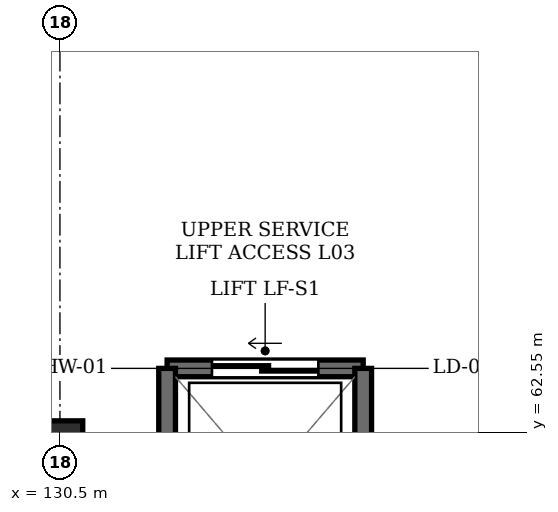
"""IFC4 building model, lengths in metres.
Left out: names, types, materials, properties, quantities, classifications, styles, units other than length and angle.
Written with IfcOpenShell. Run it as: python <this file> out.ifc"""

import sys

from ifc_helpers import new_model, si_unit, direction, frame, frame_2d, origin, origin_2d, place, context, subcontext, project, spatial, rectangle, extrude, element, fill, save


model = new_model("IFC4")
c1 = context("Model", 3, precision=1e-05, world=origin(), true_north=direction((0.0, 1.0)))
c2 = subcontext(c1, "Body", "Model", "MODEL_VIEW")
j1 = project(units=[si_unit("LENGTHUNIT", "METRE"), si_unit("PLANEANGLEUNIT", "RADIAN")], contexts=[c1])
p1 = place(None, origin())
s1 = spatial("IfcSite", under=j1, at=p1, CompositionType="ELEMENT")
p2 = place(p1, origin())
s2 = spatial("IfcBuilding", under=s1, at=p2, CompositionType="ELEMENT")
p3 = place(p2, frame((0.0, 0.0, 14.0)))
s3 = spatial("IfcBuildingStorey", under=s2, at=p3, CompositionType="ELEMENT", Elevation=14.0)
p4 = place(p3, frame((130.5, 62.4, -0.28), z_axis=(0.0, 0.0, 1.0), x_axis=(1.0, 0.0, 0.0)))
e1 = element("IfcColumn", 1, at=p4, inside=s3, PredefinedType="COLUMN", context=c2, shape_type="SweptSolid", body=[
    extrude(rectangle(XDim=0.6, YDim=0.6, at=origin_2d()), origin(), (0.0, 0.0, 1.0), 9.93),
])
p5 = place(p3, frame((134.49, 63.39, 0.0), z_axis=(0.0, 0.0, 1.0), x_axis=(-1.0, 0.0, 0.0)))
e2 = element("IfcWall", 2, at=p5, inside=s3, PredefinedType="SHEAR", context=c2, shape_type="SweptSolid", body=[
    extrude(rectangle(XDim=2.58, YDim=0.22, at=frame_2d((1.29, 0.0))), origin(), (0.0, 0.0, 1.0), 9.65),
])
p6 = place(p5, frame((0.59, 0.0, 0.0)))
e3 = element("IfcOpeningElement", 3, at=p6, cuts=e2, PredefinedType="OPENING", context=c2, shape_type="SweptSolid", body=[
    extrude(rectangle(XDim=1.4, YDim=2.3, at=frame_2d((0.7, 1.15))), frame((0.0, 0.122, 0.0), z_axis=(0.0, -1.0, 0.0), x_axis=(1.0, 0.0, 0.0)), (0.0, 0.0, 1.0), 0.244),
])
for number, where, z_axis, x_axis in (
    (4, (131.91, 63.39, 0.0), (0.0, 0.0, 1.0), (0.0, -1.0, 0.0)),
    (5, (134.49, 60.41, 0.0), (0.0, 0.0, 1.0), (0.0, 1.0, 0.0)),
):
    element("IfcWall", number, at=place(p3, frame(where, z_axis=z_axis, x_axis=x_axis)), inside=s3, PredefinedType="SHEAR", context=c2, shape_type="SweptSolid", body=[
        extrude(rectangle(XDim=2.98, YDim=0.22, at=frame_2d((1.49, 0.0))), origin(), (0.0, 0.0, 1.0), 9.65),
    ])
p7 = place(p6, origin())
e6 = element("IfcDoor", 6, at=p7, inside=s3, OperationType="SLIDING_TO_RIGHT", PredefinedType="DOOR", context=c2, shape_type="SweptSolid", body=[
    extrude(rectangle(XDim=1.4, YDim=2.3, at=frame_2d((0.7, 1.15))), frame((0.0, 0.025, 0.0), z_axis=(0.0, -1.0, 0.0), x_axis=(1.0, 0.0, 0.0)), (0.0, 0.0, 1.0), 0.05),
])
fill(e3, e6)
save(model, sys.argv[1])
